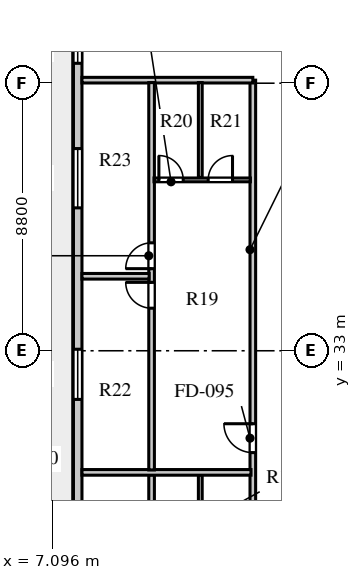
"""IFC4 building model, lengths in metres.
Left out: names, types, materials, properties, quantities, classifications, styles, units other than length and angle.
Written with IfcOpenShell. Run it as: python <this file> out.ifc"""

import sys

from ifc_helpers import new_model, si_unit, direction, frame, frame_2d, origin, place, context, subcontext, project, spatial, rectangle, extrude, element, fill, save


model = new_model("IFC4")
c1 = context("Model", 3, precision=1e-05, world=origin(), true_north=direction((0.0, 1.0)))
c2 = subcontext(c1, "Body", "Model", "MODEL_VIEW")
j1 = project(units=[si_unit("LENGTHUNIT", "METRE"), si_unit("PLANEANGLEUNIT", "RADIAN")], contexts=[c1])
p1 = place(None, origin())
s1 = spatial("IfcSite", under=j1, at=p1, CompositionType="ELEMENT")
p2 = place(p1, origin())
s2 = spatial("IfcBuilding", under=s1, at=p2, CompositionType="ELEMENT")
p3 = place(p2, frame((0.0, 0.0, 260.9)))
s3 = spatial("IfcBuildingStorey", under=s2, at=p3, CompositionType="ELEMENT", Elevation=260.9)
p4 = place(p3, frame((7.94, 44.07, 0.0), z_axis=(0.0, 0.0, 1.0), x_axis=(0.0, -1.0, 0.0)))
e1 = element("IfcWall", 1, at=p4, inside=s3, PredefinedType="STANDARD", context=c2, shape_type="SweptSolid", body=[
    extrude(rectangle(XDim=30.94, YDim=0.28, at=frame_2d((15.47, 0.0))), origin(), (0.0, 0.0, 1.0), 3.66),
])
p5 = place(p4, frame((29.325, 0.0, 0.8)))
e2 = element("IfcOpeningElement", 2, at=p5, cuts=e1, PredefinedType="OPENING", context=c2, shape_type="SweptSolid", body=[
    extrude(rectangle(XDim=0.95, YDim=1.65, at=frame_2d((0.475, 0.825))), frame((0.0, 0.15, 0.0), z_axis=(0.0, -1.0, 0.0), x_axis=(1.0, 0.0, 0.0)), (0.0, 0.0, 1.0), 0.3),
])
p6 = place(p4, frame((27.28, 0.0, 0.0)))
e3 = element("IfcOpeningElement", 3, at=p6, cuts=e1, PredefinedType="OPENING", context=c2, shape_type="SweptSolid", body=[
    extrude(rectangle(XDim=1.0, YDim=2.05, at=frame_2d((0.5, 1.025))), frame((0.0, 0.15, 0.0), z_axis=(0.0, -1.0, 0.0), x_axis=(1.0, 0.0, 0.0)), (0.0, 0.0, 1.0), 0.3),
])
p7 = place(p4, frame((23.395, 0.0, 0.8)))
e4 = element("IfcOpeningElement", 4, at=p7, cuts=e1, PredefinedType="OPENING", context=c2, shape_type="SweptSolid", body=[
    extrude(rectangle(XDim=2.1, YDim=1.95, at=frame_2d((1.05, 0.975))), frame((0.0, 0.15, 0.0), z_axis=(0.0, -1.0, 0.0), x_axis=(1.0, 0.0, 0.0)), (0.0, 0.0, 1.0), 0.3),
])
p8 = place(p4, frame((17.695, 0.0, 0.8)))
e5 = element("IfcOpeningElement", 5, at=p8, cuts=e1, PredefinedType="OPENING", context=c2, shape_type="SweptSolid", body=[
    extrude(rectangle(XDim=1.35, YDim=1.9, at=frame_2d((0.675, 0.95))), frame((0.0, 0.15, 0.0), z_axis=(0.0, -1.0, 0.0), x_axis=(1.0, 0.0, 0.0)), (0.0, 0.0, 1.0), 0.3),
])
p9 = place(p4, frame((11.02, 0.0, 0.8)))
e6 = element("IfcOpeningElement", 6, at=p9, cuts=e1, PredefinedType="OPENING", context=c2, shape_type="SweptSolid", body=[
    extrude(rectangle(XDim=1.65, YDim=1.95, at=frame_2d((0.825, 0.975))), frame((0.0, 0.15, 0.0), z_axis=(0.0, -1.0, 0.0), x_axis=(1.0, 0.0, 0.0)), (0.0, 0.0, 1.0), 0.3),
])
p10 = place(p4, frame((4.42, 0.0, 0.8)))
e7 = element("IfcOpeningElement", 7, at=p10, cuts=e1, PredefinedType="OPENING", context=c2, shape_type="SweptSolid", body=[
    extrude(rectangle(XDim=1.95, YDim=2.0, at=frame_2d((0.975, 1.0))), frame((0.0, 0.15, 0.0), z_axis=(0.0, -1.0, 0.0), x_axis=(1.0, 0.0, 0.0)), (0.0, 0.0, 1.0), 0.3),
])
p11 = place(p4, frame((0.665, 0.0, 0.8)))
e8 = element("IfcOpeningElement", 8, at=p11, cuts=e1, PredefinedType="OPENING", context=c2, shape_type="SweptSolid", body=[
    extrude(rectangle(XDim=0.95, YDim=1.65, at=frame_2d((0.475, 0.825))), frame((0.0, 0.15, 0.0), z_axis=(0.0, -1.0, 0.0), x_axis=(1.0, 0.0, 0.0)), (0.0, 0.0, 1.0), 0.3),
])
p12 = place(p3, frame((13.7, 15.3, 0.0), z_axis=(0.0, 0.0, 1.0), x_axis=(0.0, 1.0, 0.0)))
e9 = element("IfcWall", 9, at=p12, inside=s3, PredefinedType="SOLIDWALL", context=c2, shape_type="SweptSolid", body=[
    extrude(rectangle(XDim=26.6, YDim=0.185, at=frame_2d((13.3, 0.0))), origin(), (0.0, 0.0, 1.0), 3.66),
])
p13 = place(p12, frame((0.65, 0.0, 0.0)))
e10 = element("IfcOpeningElement", 10, at=p13, cuts=e9, PredefinedType="OPENING", context=c2, shape_type="SweptSolid", body=[
    extrude(rectangle(XDim=0.95, YDim=2.1, at=frame_2d((0.475, 1.05))), frame((0.0, 0.103, 0.0), z_axis=(0.0, -1.0, 0.0), x_axis=(1.0, 0.0, 0.0)), (0.0, 0.0, 1.0), 0.205),
])
p14 = place(p12, frame((7.1, 0.0, 0.0)))
e11 = element("IfcOpeningElement", 11, at=p14, cuts=e9, PredefinedType="OPENING", context=c2, shape_type="SweptSolid", body=[
    extrude(rectangle(XDim=0.95, YDim=2.1, at=frame_2d((0.475, 1.05))), frame((0.0, 0.103, 0.0), z_axis=(0.0, -1.0, 0.0), x_axis=(1.0, 0.0, 0.0)), (0.0, 0.0, 1.0), 0.205),
])
p15 = place(p12, frame((14.35, 0.0, 0.0)))
e12 = element("IfcOpeningElement", 12, at=p15, cuts=e9, PredefinedType="OPENING", context=c2, shape_type="SweptSolid", body=[
    extrude(rectangle(XDim=0.95, YDim=2.1, at=frame_2d((0.475, 1.05))), frame((0.0, 0.103, 0.0), z_axis=(0.0, -1.0, 0.0), x_axis=(1.0, 0.0, 0.0)), (0.0, 0.0, 1.0), 0.205),
])
p16 = place(p3, frame((8.08, 41.9, 0.0), z_axis=(0.0, 0.0, 1.0), x_axis=(1.0, 0.0, 0.0)))
e13 = element("IfcWall", 13, at=p16, inside=s3, PredefinedType="SOLIDWALL", context=c2, shape_type="SweptSolid", body=[
    extrude(rectangle(XDim=5.62, YDim=0.185, at=frame_2d((2.81, 0.0))), origin(), (0.0, 0.0, 1.0), 3.21),
])
p17 = place(p3, frame((10.37, 22.48, 0.0), z_axis=(0.0, 0.0, 1.0), x_axis=(0.0, 1.0, 0.0)))
e14 = element("IfcWall", 14, at=p17, inside=s3, PredefinedType="SOLIDWALL", context=c2, shape_type="SweptSolid", body=[
    extrude(rectangle(XDim=6.44, YDim=0.185, at=frame_2d((3.22, 0.0))), origin(), (0.0, 0.0, 1.0), 3.66),
])
p18 = place(p17, frame((0.4, 0.0, 0.0)))
e15 = element("IfcOpeningElement", 15, at=p18, cuts=e14, PredefinedType="OPENING", context=c2, shape_type="SweptSolid", body=[
    extrude(rectangle(XDim=0.9, YDim=2.08, at=frame_2d((0.45, 1.04))), frame((0.0, 0.103, 0.0), z_axis=(0.0, -1.0, 0.0), x_axis=(1.0, 0.0, 0.0)), (0.0, 0.0, 1.0), 0.205),
])
p19 = place(p3, frame((11.972, 26.6, 0.0), z_axis=(0.0, 0.0, 1.0), x_axis=(0.0, 1.0, 0.0)))
e16 = element("IfcWall", 16, at=p19, inside=s3, PredefinedType="PLUMBINGWALL", context=c2, shape_type="SweptSolid", body=[
    extrude(rectangle(XDim=2.32, YDim=0.125, at=frame_2d((1.16, 0.0))), origin(), (0.0, 0.0, 1.0), 3.66),
])
p20 = place(p3, frame((8.08, 29.0, 0.0), z_axis=(0.0, 0.0, 1.0), x_axis=(1.0, 0.0, 0.0)))
e17 = element("IfcWall", 17, at=p20, inside=s3, PredefinedType="SOLIDWALL", context=c2, shape_type="SweptSolid", body=[
    extrude(rectangle(XDim=5.56, YDim=0.185, at=frame_2d((2.78, 0.0))), origin(), (0.0, 0.0, 1.0), 3.66),
])
p21 = place(p3, frame((10.37, 29.08, 0.0), z_axis=(0.0, 0.0, 1.0), x_axis=(0.0, 1.0, 0.0)))
e18 = element("IfcWall", 18, at=p21, inside=s3, PredefinedType="SOLIDWALL", context=c2, shape_type="SweptSolid", body=[
    extrude(rectangle(XDim=12.74, YDim=0.185, at=frame_2d((6.37, 0.0))), origin(), (0.0, 0.0, 1.0), 3.66),
])
p22 = place(p21, frame((5.32, 0.0, 0.0)))
e19 = element("IfcOpeningElement", 19, at=p22, cuts=e18, PredefinedType="OPENING", context=c2, shape_type="SweptSolid", body=[
    extrude(rectangle(XDim=0.85, YDim=2.08, at=frame_2d((0.425, 1.04))), frame((0.0, 0.103, 0.0), z_axis=(0.0, -1.0, 0.0), x_axis=(1.0, 0.0, 0.0)), (0.0, 0.0, 1.0), 0.205),
])
p23 = place(p21, frame((6.62, 0.0, 0.0)))
e20 = element("IfcOpeningElement", 20, at=p23, cuts=e18, PredefinedType="OPENING", context=c2, shape_type="SweptSolid", body=[
    extrude(rectangle(XDim=0.85, YDim=2.08, at=frame_2d((0.425, 1.04))), frame((0.0, 0.103, 0.0), z_axis=(0.0, -1.0, 0.0), x_axis=(1.0, 0.0, 0.0)), (0.0, 0.0, 1.0), 0.205),
])
p24 = place(p3, frame((10.45, 38.62, 0.0), z_axis=(0.0, 0.0, 1.0), x_axis=(1.0, 0.0, 0.0)))
e21 = element("IfcWall", 21, at=p24, inside=s3, PredefinedType="PLUMBINGWALL", context=c2, shape_type="SweptSolid", body=[
    extrude(rectangle(XDim=3.17, YDim=0.125, at=frame_2d((1.585, 0.0))), origin(), (0.0, 0.0, 1.0), 3.66),
])
p25 = place(p24, frame((0.16, 0.0, 0.0)))
e22 = element("IfcOpeningElement", 22, at=p25, cuts=e21, PredefinedType="OPENING", context=c2, shape_type="SweptSolid", body=[
    extrude(rectangle(XDim=0.8, YDim=2.05, at=frame_2d((0.4, 1.025))), frame((0.0, 0.073, 0.0), z_axis=(0.0, -1.0, 0.0), x_axis=(1.0, 0.0, 0.0)), (0.0, 0.0, 1.0), 0.145),
])
p26 = place(p24, frame((1.782, 0.0, 0.0)))
e23 = element("IfcOpeningElement", 23, at=p26, cuts=e21, PredefinedType="OPENING", context=c2, shape_type="SweptSolid", body=[
    extrude(rectangle(XDim=0.8, YDim=2.05, at=frame_2d((0.4, 1.025))), frame((0.0, 0.073, 0.0), z_axis=(0.0, -1.0, 0.0), x_axis=(1.0, 0.0, 0.0)), (0.0, 0.0, 1.0), 0.145),
])
p27 = place(p3, frame((11.972, 38.7, 0.0), z_axis=(0.0, 0.0, 1.0), x_axis=(0.0, 1.0, 0.0)))
e24 = element("IfcWall", 24, at=p27, inside=s3, PredefinedType="PLUMBINGWALL", context=c2, shape_type="SweptSolid", body=[
    extrude(rectangle(XDim=3.12, YDim=0.125, at=frame_2d((1.56, 0.0))), origin(), (0.0, 0.0, 1.0), 3.66),
])
p28 = place(p3, frame((8.08, 35.45, 0.0), z_axis=(0.0, 0.0, 1.0), x_axis=(1.0, 0.0, 0.0)))
e25 = element("IfcWall", 25, at=p28, inside=s3, PredefinedType="SOLIDWALL", context=c2, shape_type="SweptSolid", body=[
    extrude(rectangle(XDim=2.21, YDim=0.185, at=frame_2d((1.105, 0.0))), origin(), (0.0, 0.0, 1.0), 3.66),
])
p29 = place(p9, origin())
e26 = element("IfcWindow", 26, at=p29, inside=s3, PartitioningType="SINGLE_PANEL", PredefinedType="WINDOW", context=c2, shape_type="SweptSolid", body=[
    extrude(rectangle(XDim=1.65, YDim=1.95, at=frame_2d((0.825, 0.975))), frame((0.0, 0.03, 0.0), z_axis=(0.0, -1.0, 0.0), x_axis=(1.0, 0.0, 0.0)), (0.0, 0.0, 1.0), 0.06),
])
fill(e6, e26)
p30 = place(p10, origin())
e27 = element("IfcWindow", 27, at=p30, inside=s3, PartitioningType="SINGLE_PANEL", PredefinedType="WINDOW", context=c2, shape_type="SweptSolid", body=[
    extrude(rectangle(XDim=1.95, YDim=2.0, at=frame_2d((0.975, 1.0))), frame((0.0, 0.03, 0.0), z_axis=(0.0, -1.0, 0.0), x_axis=(1.0, 0.0, 0.0)), (0.0, 0.0, 1.0), 0.06),
])
fill(e7, e27)
p31 = place(p11, origin())
e28 = element("IfcWindow", 28, at=p31, inside=s3, PartitioningType="SINGLE_PANEL", PredefinedType="WINDOW", context=c2, shape_type="SweptSolid", body=[
    extrude(rectangle(XDim=0.95, YDim=1.65, at=frame_2d((0.475, 0.825))), frame((0.0, 0.03, 0.0), z_axis=(0.0, -1.0, 0.0), x_axis=(1.0, 0.0, 0.0)), (0.0, 0.0, 1.0), 0.06),
])
fill(e8, e28)
p32 = place(p25, origin())
e29 = element("IfcDoor", 29, at=p32, inside=s3, OperationType="SINGLE_SWING_LEFT", PredefinedType="DOOR", context=c2, shape_type="SweptSolid", body=[
    extrude(rectangle(XDim=0.8, YDim=2.05, at=frame_2d((0.4, 1.025))), frame((0.0, 0.025, 0.0), z_axis=(0.0, -1.0, 0.0), x_axis=(1.0, 0.0, 0.0)), (0.0, 0.0, 1.0), 0.05),
])
fill(e22, e29)
p33 = place(p26, origin())
e30 = element("IfcDoor", 30, at=p33, inside=s3, OperationType="SINGLE_SWING_RIGHT", PredefinedType="DOOR", context=c2, shape_type="SweptSolid", body=[
    extrude(rectangle(XDim=0.8, YDim=2.05, at=frame_2d((0.4, 1.025))), frame((0.0, 0.025, 0.0), z_axis=(0.0, -1.0, 0.0), x_axis=(1.0, 0.0, 0.0)), (0.0, 0.0, 1.0), 0.05),
])
fill(e23, e30)
p34 = place(p22, frame((0.85, 0.0, 0.0), z_axis=(0.0, 0.0, 1.0), x_axis=(-1.0, 0.0, 0.0)))
e31 = element("IfcDoor", 31, at=p34, inside=s3, OperationType="SINGLE_SWING_LEFT", PredefinedType="DOOR", context=c2, shape_type="SweptSolid", body=[
    extrude(rectangle(XDim=0.85, YDim=2.08, at=frame_2d((0.425, 1.04))), frame((0.0, 0.025, 0.0), z_axis=(0.0, -1.0, 0.0), x_axis=(1.0, 0.0, 0.0)), (0.0, 0.0, 1.0), 0.05),
])
fill(e19, e31)
p35 = place(p23, frame((0.85, 0.0, 0.0), z_axis=(0.0, 0.0, 1.0), x_axis=(-1.0, 0.0, 0.0)))
e32 = element("IfcDoor", 32, at=p35, inside=s3, OperationType="SINGLE_SWING_RIGHT", PredefinedType="DOOR", context=c2, shape_type="SweptSolid", body=[
    extrude(rectangle(XDim=0.85, YDim=2.08, at=frame_2d((0.425, 1.04))), frame((0.0, 0.025, 0.0), z_axis=(0.0, -1.0, 0.0), x_axis=(1.0, 0.0, 0.0)), (0.0, 0.0, 1.0), 0.05),
])
fill(e20, e32)
p36 = place(p15, frame((0.95, 0.0, 0.0), z_axis=(0.0, 0.0, 1.0), x_axis=(-1.0, 0.0, 0.0)))
e33 = element("IfcDoor", 33, at=p36, inside=s3, OperationType="SINGLE_SWING_LEFT", PredefinedType="DOOR", context=c2, shape_type="SweptSolid", body=[
    extrude(rectangle(XDim=0.95, YDim=2.1, at=frame_2d((0.475, 1.05))), frame((0.0, 0.025, 0.0), z_axis=(0.0, -1.0, 0.0), x_axis=(1.0, 0.0, 0.0)), (0.0, 0.0, 1.0), 0.05),
])
fill(e12, e33)
save(model, sys.argv[1])
